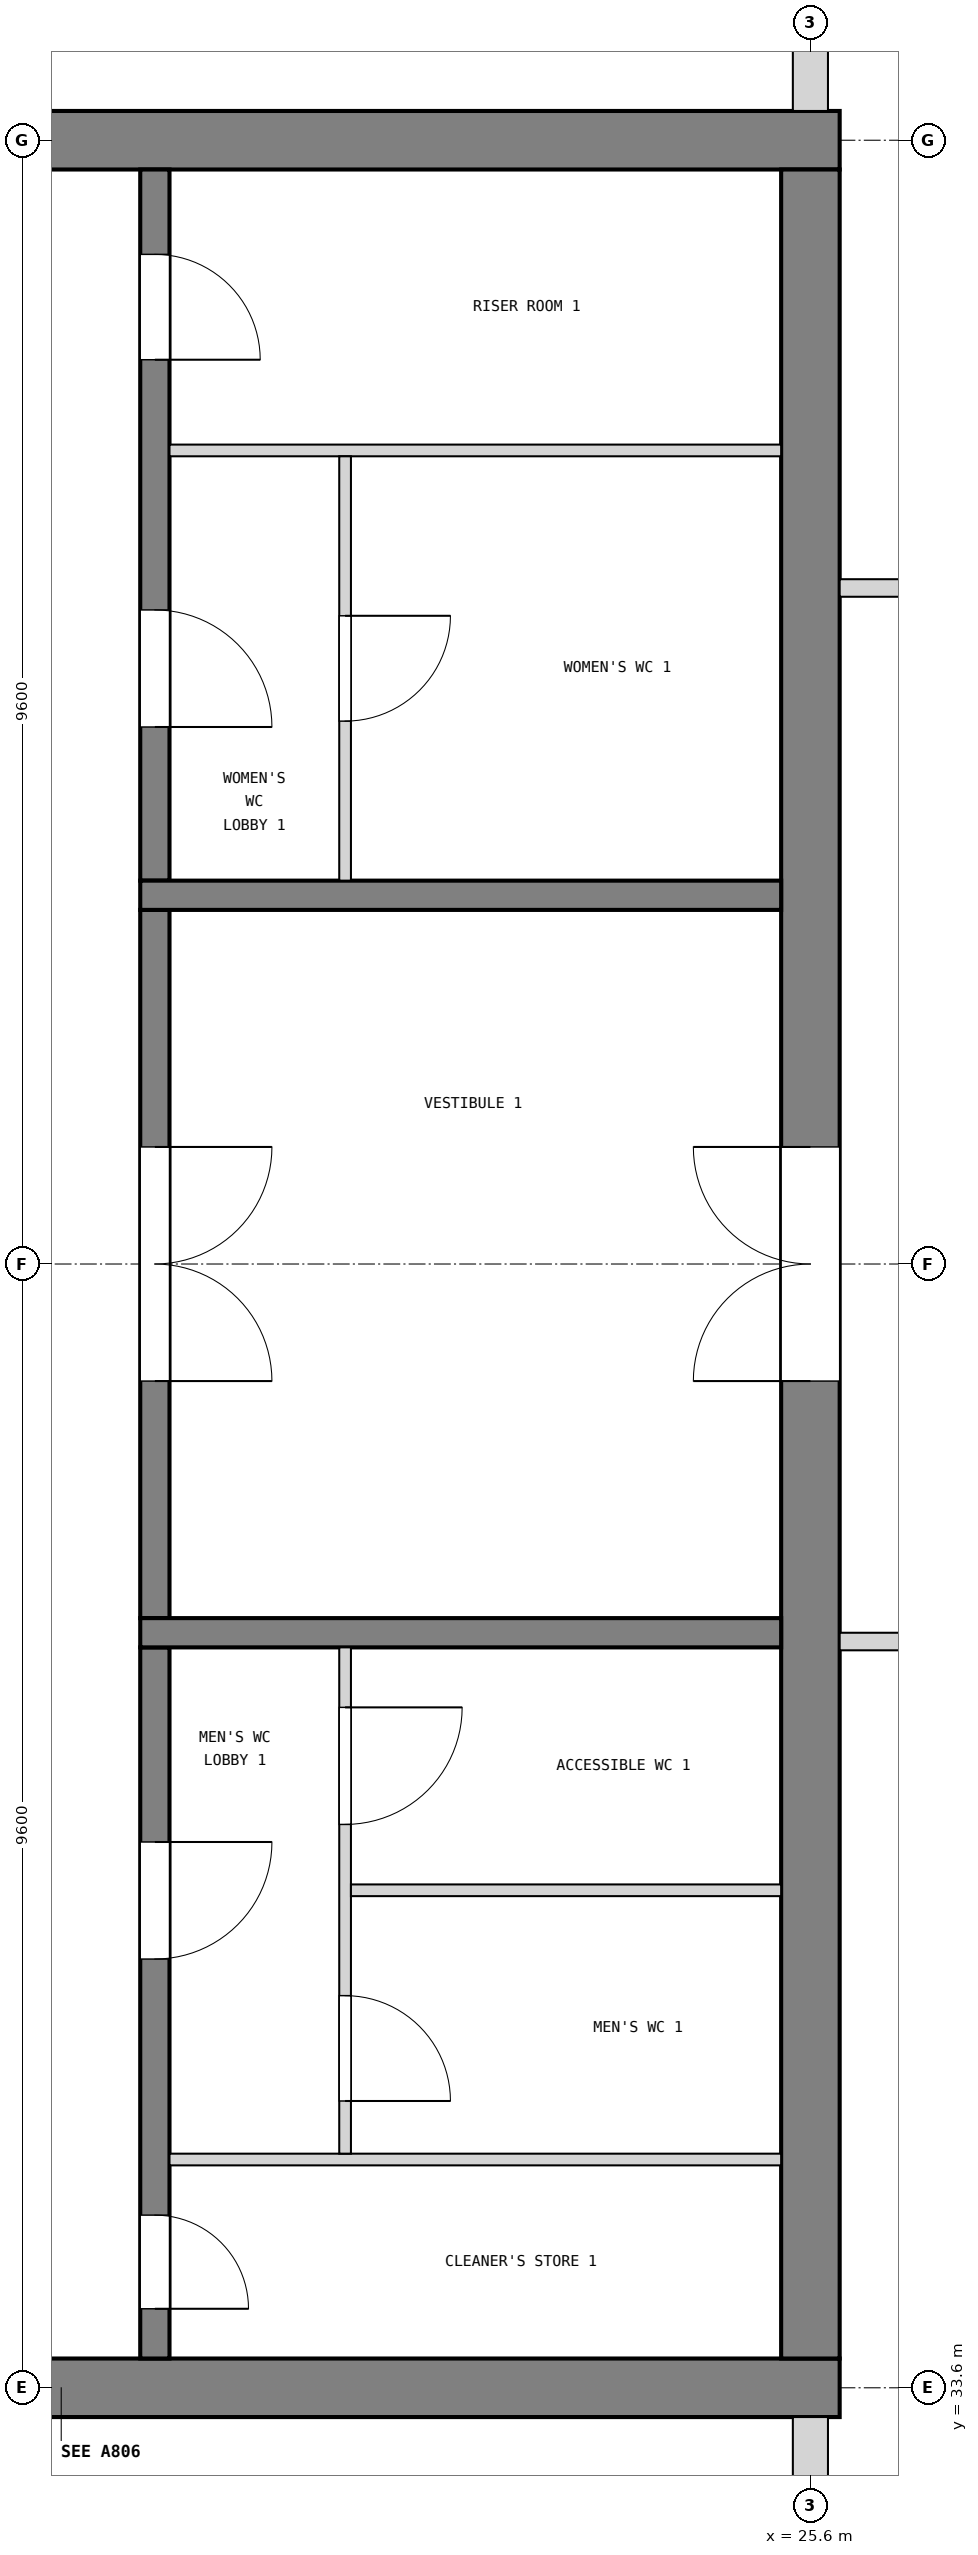
"""IFC4 building model, lengths in metres.
Left out: names, types, materials, properties, quantities, classifications, styles, units other than length and angle.
Written with IfcOpenShell. Run it as: python <this file> out.ifc"""

import sys

from ifc_helpers import new_model, si_unit, direction, frame, frame_2d, origin, place, context, subcontext, project, spatial, rectangle, extrude, element, fill, save


model = new_model("IFC4")
c1 = context("Model", 3, precision=1e-05, world=origin(), true_north=direction((0.0, 1.0)))
c2 = subcontext(c1, "Body", "Model", "MODEL_VIEW")
j1 = project(units=[si_unit("LENGTHUNIT", "METRE"), si_unit("PLANEANGLEUNIT", "RADIAN")], contexts=[c1])
p1 = place(None, origin())
s1 = spatial("IfcSite", under=j1, at=p1, CompositionType="ELEMENT")
p2 = place(p1, origin())
s2 = spatial("IfcBuilding", under=s1, at=p2, CompositionType="ELEMENT")
p3 = place(p2, frame((0.0, 0.0, 17.1)))
s3 = spatial("IfcBuildingStorey", under=s2, at=p3, CompositionType="ELEMENT", Elevation=17.1)
p4 = place(p3, frame((12.55, 52.8, 0.0), z_axis=(0.0, 0.0, 1.0), x_axis=(1.0, 0.0, 0.0)))
e1 = element("IfcWall", 1, at=p4, inside=s3, PredefinedType="SHEAR", context=c2, shape_type="SweptSolid", body=[
    extrude(rectangle(XDim=13.3, YDim=0.5, at=frame_2d((6.65, 0.0))), origin(), (0.0, 0.0, 1.0), 3.9),
])
p5 = place(p4, frame((1.85, 0.0, 1.0)))
e2 = element("IfcOpeningElement", 2, at=p5, cuts=e1, PredefinedType="OPENING", context=c2, shape_type="SweptSolid", body=[
    extrude(rectangle(XDim=0.4, YDim=2.0, at=frame_2d((0.2, 1.0))), frame((0.0, 0.26, 0.0), z_axis=(0.0, -1.0, 0.0), x_axis=(1.0, 0.0, 0.0)), (0.0, 0.0, 1.0), 0.52),
])
p6 = place(p3, frame((12.55, 33.6, 0.0), z_axis=(0.0, 0.0, 1.0), x_axis=(1.0, 0.0, 0.0)))
e3 = element("IfcWall", 3, at=p6, inside=s3, PredefinedType="SHEAR", context=c2, shape_type="SweptSolid", body=[
    extrude(rectangle(XDim=13.3, YDim=0.5, at=frame_2d((6.65, 0.0))), origin(), (0.0, 0.0, 1.0), 3.9),
])
p7 = place(p6, frame((1.85, 0.0, 1.0)))
e4 = element("IfcOpeningElement", 4, at=p7, cuts=e3, PredefinedType="OPENING", context=c2, shape_type="SweptSolid", body=[
    extrude(rectangle(XDim=0.4, YDim=2.0, at=frame_2d((0.2, 1.0))), frame((0.0, 0.26, 0.0), z_axis=(0.0, -1.0, 0.0), x_axis=(1.0, 0.0, 0.0)), (0.0, 0.0, 1.0), 0.52),
])
p8 = place(p3, frame((25.6, 33.85, 0.0), z_axis=(0.0, 0.0, 1.0), x_axis=(0.0, 1.0, 0.0)))
e5 = element("IfcWall", 5, at=p8, inside=s3, PredefinedType="SHEAR", context=c2, shape_type="SweptSolid", body=[
    extrude(rectangle(XDim=18.7, YDim=0.5, at=frame_2d((9.35, 0.0))), origin(), (0.0, 0.0, 1.0), 3.9),
])
p9 = place(p8, frame((8.35, 0.0, 0.0)))
e6 = element("IfcOpeningElement", 6, at=p9, cuts=e5, PredefinedType="OPENING", context=c2, shape_type="SweptSolid", body=[
    extrude(rectangle(XDim=2.0, YDim=2.1, at=frame_2d((1.0, 1.05))), frame((0.0, 0.26, 0.0), z_axis=(0.0, -1.0, 0.0), x_axis=(1.0, 0.0, 0.0)), (0.0, 0.0, 1.0), 0.52),
])
p10 = place(p3, frame((25.6, 31.0, 0.0), z_axis=(0.0, 0.0, 1.0), x_axis=(0.0, 1.0, 0.0)))
e7 = element("IfcWall", 7, at=p10, inside=s3, PredefinedType="SOLIDWALL", context=c2, shape_type="SweptSolid", body=[
    extrude(rectangle(XDim=2.35, YDim=0.3, at=frame_2d((1.175, 0.0))), origin(), (0.0, 0.0, 1.0), 2.88),
])
p11 = place(p3, frame((25.6, 53.05, 0.0), z_axis=(0.0, 0.0, 1.0), x_axis=(0.0, 1.0, 0.0)))
e8 = element("IfcWall", 8, at=p11, inside=s3, PredefinedType="SOLIDWALL", context=c2, shape_type="SweptSolid", body=[
    extrude(rectangle(XDim=2.35, YDim=0.3, at=frame_2d((1.175, 0.0))), origin(), (0.0, 0.0, 1.0), 2.88),
])
p12 = place(p3, frame((20.0, 33.85, 0.0), z_axis=(0.0, 0.0, 1.0), x_axis=(0.0, 1.0, 0.0)))
e9 = element("IfcWall", 9, at=p12, inside=s3, PredefinedType="SOLIDWALL", context=c2, shape_type="SweptSolid", body=[
    extrude(rectangle(XDim=6.075, YDim=0.25, at=frame_2d((3.038, 0.0))), origin(), (0.0, 0.0, 1.0), 3.6),
])
p13 = place(p12, frame((0.425, 0.0, 0.0)))
e10 = element("IfcOpeningElement", 10, at=p13, cuts=e9, PredefinedType="OPENING", context=c2, shape_type="SweptSolid", body=[
    extrude(rectangle(XDim=0.8, YDim=2.1, at=frame_2d((0.4, 1.05))), frame((0.0, 0.135, 0.0), z_axis=(0.0, -1.0, 0.0), x_axis=(1.0, 0.0, 0.0)), (0.0, 0.0, 1.0), 0.27),
])
p14 = place(p12, frame((3.413, 0.0, 0.0)))
e11 = element("IfcOpeningElement", 11, at=p14, cuts=e9, PredefinedType="OPENING", context=c2, shape_type="SweptSolid", body=[
    extrude(rectangle(XDim=1.0, YDim=2.1, at=frame_2d((0.5, 1.05))), frame((0.0, 0.135, 0.0), z_axis=(0.0, -1.0, 0.0), x_axis=(1.0, 0.0, 0.0)), (0.0, 0.0, 1.0), 0.27),
])
p15 = place(p3, frame((20.0, 40.175, 0.0), z_axis=(0.0, 0.0, 1.0), x_axis=(0.0, 1.0, 0.0)))
e12 = element("IfcWall", 12, at=p15, inside=s3, PredefinedType="SOLIDWALL", context=c2, shape_type="SweptSolid", body=[
    extrude(rectangle(XDim=6.05, YDim=0.25, at=frame_2d((3.025, 0.0))), origin(), (0.0, 0.0, 1.0), 3.6),
])
p16 = place(p15, frame((2.025, 0.0, 0.0)))
e13 = element("IfcOpeningElement", 13, at=p16, cuts=e12, PredefinedType="OPENING", context=c2, shape_type="SweptSolid", body=[
    extrude(rectangle(XDim=2.0, YDim=2.1, at=frame_2d((1.0, 1.05))), frame((0.0, 0.135, 0.0), z_axis=(0.0, -1.0, 0.0), x_axis=(1.0, 0.0, 0.0)), (0.0, 0.0, 1.0), 0.27),
])
p17 = place(p3, frame((20.0, 46.475, 0.0), z_axis=(0.0, 0.0, 1.0), x_axis=(0.0, 1.0, 0.0)))
e14 = element("IfcWall", 14, at=p17, inside=s3, PredefinedType="SOLIDWALL", context=c2, shape_type="SweptSolid", body=[
    extrude(rectangle(XDim=6.075, YDim=0.25, at=frame_2d((3.038, 0.0))), origin(), (0.0, 0.0, 1.0), 3.6),
])
p18 = place(p17, frame((1.312, 0.0, 0.0)))
e15 = element("IfcOpeningElement", 15, at=p18, cuts=e14, PredefinedType="OPENING", context=c2, shape_type="SweptSolid", body=[
    extrude(rectangle(XDim=1.0, YDim=2.1, at=frame_2d((0.5, 1.05))), frame((0.0, 0.135, 0.0), z_axis=(0.0, -1.0, 0.0), x_axis=(1.0, 0.0, 0.0)), (0.0, 0.0, 1.0), 0.27),
])
p19 = place(p17, frame((4.45, 0.0, 0.0)))
e16 = element("IfcOpeningElement", 16, at=p19, cuts=e14, PredefinedType="OPENING", context=c2, shape_type="SweptSolid", body=[
    extrude(rectangle(XDim=0.9, YDim=2.1, at=frame_2d((0.45, 1.05))), frame((0.0, 0.135, 0.0), z_axis=(0.0, -1.0, 0.0), x_axis=(1.0, 0.0, 0.0)), (0.0, 0.0, 1.0), 0.27),
])
for number, where, z_axis, x_axis in (
    (17, (19.875, 40.05, 0.0), (0.0, 0.0, 1.0), (1.0, 0.0, 0.0)),
    (18, (19.875, 46.35, 0.0), (0.0, 0.0, 1.0), (1.0, 0.0, 0.0)),
):
    element("IfcWall", number, at=place(p3, frame(where, z_axis=z_axis, x_axis=x_axis)), inside=s3, PredefinedType="SOLIDWALL", context=c2, shape_type="SweptSolid", body=[
        extrude(rectangle(XDim=5.475, YDim=0.25, at=frame_2d((2.738, 0.0))), origin(), (0.0, 0.0, 1.0), 3.6),
    ])
p20 = place(p3, frame((20.125, 35.55, 0.0), z_axis=(0.0, 0.0, 1.0), x_axis=(1.0, 0.0, 0.0)))
e19 = element("IfcWall", 19, at=p20, inside=s3, PredefinedType="PARTITIONING", context=c2, shape_type="SweptSolid", body=[
    extrude(rectangle(XDim=5.225, YDim=0.1, at=frame_2d((2.613, 0.0))), origin(), (0.0, 0.0, 1.0), 3.6),
])
p21 = place(p3, frame((21.625, 35.6, 0.0), z_axis=(0.0, 0.0, 1.0), x_axis=(0.0, 1.0, 0.0)))
e20 = element("IfcWall", 20, at=p21, inside=s3, PredefinedType="PARTITIONING", context=c2, shape_type="SweptSolid", body=[
    extrude(rectangle(XDim=4.325, YDim=0.1, at=frame_2d((2.163, 0.0))), origin(), (0.0, 0.0, 1.0), 3.6),
])
p22 = place(p21, frame((0.45, 0.0, 0.0)))
e21 = element("IfcOpeningElement", 21, at=p22, cuts=e20, PredefinedType="OPENING", context=c2, shape_type="SweptSolid", body=[
    extrude(rectangle(XDim=0.9, YDim=2.1, at=frame_2d((0.45, 1.05))), frame((0.0, 0.06, 0.0), z_axis=(0.0, -1.0, 0.0), x_axis=(1.0, 0.0, 0.0)), (0.0, 0.0, 1.0), 0.12),
])
p23 = place(p21, frame((2.812, 0.0, 0.0)))
e22 = element("IfcOpeningElement", 22, at=p23, cuts=e20, PredefinedType="OPENING", context=c2, shape_type="SweptSolid", body=[
    extrude(rectangle(XDim=1.0, YDim=2.1, at=frame_2d((0.5, 1.05))), frame((0.0, 0.06, 0.0), z_axis=(0.0, -1.0, 0.0), x_axis=(1.0, 0.0, 0.0)), (0.0, 0.0, 1.0), 0.12),
])
p24 = place(p3, frame((21.675, 37.85, 0.0), z_axis=(0.0, 0.0, 1.0), x_axis=(1.0, 0.0, 0.0)))
e23 = element("IfcWall", 23, at=p24, inside=s3, PredefinedType="PARTITIONING", context=c2, shape_type="SweptSolid", body=[
    extrude(rectangle(XDim=3.675, YDim=0.1, at=frame_2d((1.837, 0.0))), origin(), (0.0, 0.0, 1.0), 3.6),
])
p25 = place(p3, frame((20.125, 50.15, 0.0), z_axis=(0.0, 0.0, 1.0), x_axis=(1.0, 0.0, 0.0)))
e24 = element("IfcWall", 24, at=p25, inside=s3, PredefinedType="PARTITIONING", context=c2, shape_type="SweptSolid", body=[
    extrude(rectangle(XDim=5.225, YDim=0.1, at=frame_2d((2.613, 0.0))), origin(), (0.0, 0.0, 1.0), 3.6),
])
p26 = place(p3, frame((21.625, 46.475, 0.0), z_axis=(0.0, 0.0, 1.0), x_axis=(0.0, 1.0, 0.0)))
e25 = element("IfcWall", 25, at=p26, inside=s3, PredefinedType="PARTITIONING", context=c2, shape_type="SweptSolid", body=[
    extrude(rectangle(XDim=3.625, YDim=0.1, at=frame_2d((1.812, 0.0))), origin(), (0.0, 0.0, 1.0), 3.6),
])
p27 = place(p26, frame((1.363, 0.0, 0.0)))
e26 = element("IfcOpeningElement", 26, at=p27, cuts=e25, PredefinedType="OPENING", context=c2, shape_type="SweptSolid", body=[
    extrude(rectangle(XDim=0.9, YDim=2.1, at=frame_2d((0.45, 1.05))), frame((0.0, 0.06, 0.0), z_axis=(0.0, -1.0, 0.0), x_axis=(1.0, 0.0, 0.0)), (0.0, 0.0, 1.0), 0.12),
])
p28 = place(p3, frame((25.85, 48.975, 0.0), z_axis=(0.0, 0.0, 1.0), x_axis=(1.0, 0.0, 0.0)))
e27 = element("IfcWall", 27, at=p28, inside=s3, PredefinedType="PARTITIONING", context=c2, shape_type="SweptSolid", body=[
    extrude(rectangle(XDim=5.97, YDim=0.15, at=frame_2d((2.985, 0.0))), origin(), (0.0, 0.0, 1.0), 3.68),
])
p29 = place(p28, frame((2.05, 0.0, 0.0)))
e28 = element("IfcOpeningElement", 28, at=p29, cuts=e27, PredefinedType="OPENING", context=c2, shape_type="SweptSolid", body=[
    extrude(rectangle(XDim=1.8, YDim=2.1, at=frame_2d((0.9, 1.05))), frame((0.0, 0.085, 0.0), z_axis=(0.0, -1.0, 0.0), x_axis=(1.0, 0.0, 0.0)), (0.0, 0.0, 1.0), 0.17),
])
p30 = place(p3, frame((25.85, 39.975, 0.0), z_axis=(0.0, 0.0, 1.0), x_axis=(1.0, 0.0, 0.0)))
e29 = element("IfcWall", 29, at=p30, inside=s3, PredefinedType="PARTITIONING", context=c2, shape_type="SweptSolid", body=[
    extrude(rectangle(XDim=5.97, YDim=0.15, at=frame_2d((2.985, 0.0))), origin(), (0.0, 0.0, 1.0), 3.68),
])
p31 = place(p30, frame((2.45, 0.0, 0.0)))
e30 = element("IfcOpeningElement", 30, at=p31, cuts=e29, PredefinedType="OPENING", context=c2, shape_type="SweptSolid", body=[
    extrude(rectangle(XDim=1.0, YDim=2.1, at=frame_2d((0.5, 1.05))), frame((0.0, 0.085, 0.0), z_axis=(0.0, -1.0, 0.0), x_axis=(1.0, 0.0, 0.0)), (0.0, 0.0, 1.0), 0.17),
])
p32 = place(p16, frame((2.0, 0.0, 0.0), z_axis=(0.0, 0.0, 1.0), x_axis=(-1.0, 0.0, 0.0)))
e31 = element("IfcDoor", 31, at=p32, inside=s3, OperationType="DOUBLE_DOOR_SINGLE_SWING", PredefinedType="DOOR", context=c2, shape_type="SweptSolid", body=[
    extrude(rectangle(XDim=2.0, YDim=2.1, at=frame_2d((1.0, 1.05))), frame((0.0, 0.025, 0.0), z_axis=(0.0, -1.0, 0.0), x_axis=(1.0, 0.0, 0.0)), (0.0, 0.0, 1.0), 0.05),
])
fill(e13, e31)
p33 = place(p9, origin())
e32 = element("IfcDoor", 32, at=p33, inside=s3, OperationType="DOUBLE_DOOR_SINGLE_SWING", PredefinedType="DOOR", context=c2, shape_type="SweptSolid", body=[
    extrude(rectangle(XDim=2.0, YDim=2.1, at=frame_2d((1.0, 1.05))), frame((0.0, 0.025, 0.0), z_axis=(0.0, -1.0, 0.0), x_axis=(1.0, 0.0, 0.0)), (0.0, 0.0, 1.0), 0.05),
])
fill(e6, e32)
p34 = place(p13, frame((0.8, 0.0, 0.0), z_axis=(0.0, 0.0, 1.0), x_axis=(-1.0, 0.0, 0.0)))
e33 = element("IfcDoor", 33, at=p34, inside=s3, OperationType="SINGLE_SWING_RIGHT", PredefinedType="DOOR", context=c2, shape_type="SweptSolid", body=[
    extrude(rectangle(XDim=0.8, YDim=2.1, at=frame_2d((0.4, 1.05))), frame((0.0, 0.025, 0.0), z_axis=(0.0, -1.0, 0.0), x_axis=(1.0, 0.0, 0.0)), (0.0, 0.0, 1.0), 0.05),
])
fill(e10, e33)
p35 = place(p14, frame((1.0, 0.0, 0.0), z_axis=(0.0, 0.0, 1.0), x_axis=(-1.0, 0.0, 0.0)))
e34 = element("IfcDoor", 34, at=p35, inside=s3, OperationType="SINGLE_SWING_LEFT", PredefinedType="DOOR", context=c2, shape_type="SweptSolid", body=[
    extrude(rectangle(XDim=1.0, YDim=2.1, at=frame_2d((0.5, 1.05))), frame((0.0, 0.025, 0.0), z_axis=(0.0, -1.0, 0.0), x_axis=(1.0, 0.0, 0.0)), (0.0, 0.0, 1.0), 0.05),
])
fill(e11, e34)
p36 = place(p22, frame((0.9, 0.0, 0.0), z_axis=(0.0, 0.0, 1.0), x_axis=(-1.0, 0.0, 0.0)))
e35 = element("IfcDoor", 35, at=p36, inside=s3, OperationType="SINGLE_SWING_RIGHT", PredefinedType="DOOR", context=c2, shape_type="SweptSolid", body=[
    extrude(rectangle(XDim=0.9, YDim=2.1, at=frame_2d((0.45, 1.05))), frame((0.0, 0.025, 0.0), z_axis=(0.0, -1.0, 0.0), x_axis=(1.0, 0.0, 0.0)), (0.0, 0.0, 1.0), 0.05),
])
fill(e21, e35)
p37 = place(p23, frame((1.0, 0.0, 0.0), z_axis=(0.0, 0.0, 1.0), x_axis=(-1.0, 0.0, 0.0)))
e36 = element("IfcDoor", 36, at=p37, inside=s3, OperationType="SINGLE_SWING_LEFT", PredefinedType="DOOR", context=c2, shape_type="SweptSolid", body=[
    extrude(rectangle(XDim=1.0, YDim=2.1, at=frame_2d((0.5, 1.05))), frame((0.0, 0.025, 0.0), z_axis=(0.0, -1.0, 0.0), x_axis=(1.0, 0.0, 0.0)), (0.0, 0.0, 1.0), 0.05),
])
fill(e22, e36)
p38 = place(p18, frame((1.0, 0.0, 0.0), z_axis=(0.0, 0.0, 1.0), x_axis=(-1.0, 0.0, 0.0)))
e37 = element("IfcDoor", 37, at=p38, inside=s3, OperationType="SINGLE_SWING_RIGHT", PredefinedType="DOOR", context=c2, shape_type="SweptSolid", body=[
    extrude(rectangle(XDim=1.0, YDim=2.1, at=frame_2d((0.5, 1.05))), frame((0.0, 0.025, 0.0), z_axis=(0.0, -1.0, 0.0), x_axis=(1.0, 0.0, 0.0)), (0.0, 0.0, 1.0), 0.05),
])
fill(e15, e37)
p39 = place(p27, frame((0.9, 0.0, 0.0), z_axis=(0.0, 0.0, 1.0), x_axis=(-1.0, 0.0, 0.0)))
e38 = element("IfcDoor", 38, at=p39, inside=s3, OperationType="SINGLE_SWING_LEFT", PredefinedType="DOOR", context=c2, shape_type="SweptSolid", body=[
    extrude(rectangle(XDim=0.9, YDim=2.1, at=frame_2d((0.45, 1.05))), frame((0.0, 0.025, 0.0), z_axis=(0.0, -1.0, 0.0), x_axis=(1.0, 0.0, 0.0)), (0.0, 0.0, 1.0), 0.05),
])
fill(e26, e38)
p40 = place(p19, frame((0.9, 0.0, 0.0), z_axis=(0.0, 0.0, 1.0), x_axis=(-1.0, 0.0, 0.0)))
e39 = element("IfcDoor", 39, at=p40, inside=s3, OperationType="SINGLE_SWING_RIGHT", PredefinedType="DOOR", context=c2, shape_type="SweptSolid", body=[
    extrude(rectangle(XDim=0.9, YDim=2.1, at=frame_2d((0.45, 1.05))), frame((0.0, 0.025, 0.0), z_axis=(0.0, -1.0, 0.0), x_axis=(1.0, 0.0, 0.0)), (0.0, 0.0, 1.0), 0.05),
])
fill(e16, e39)
save(model, sys.argv[1])
